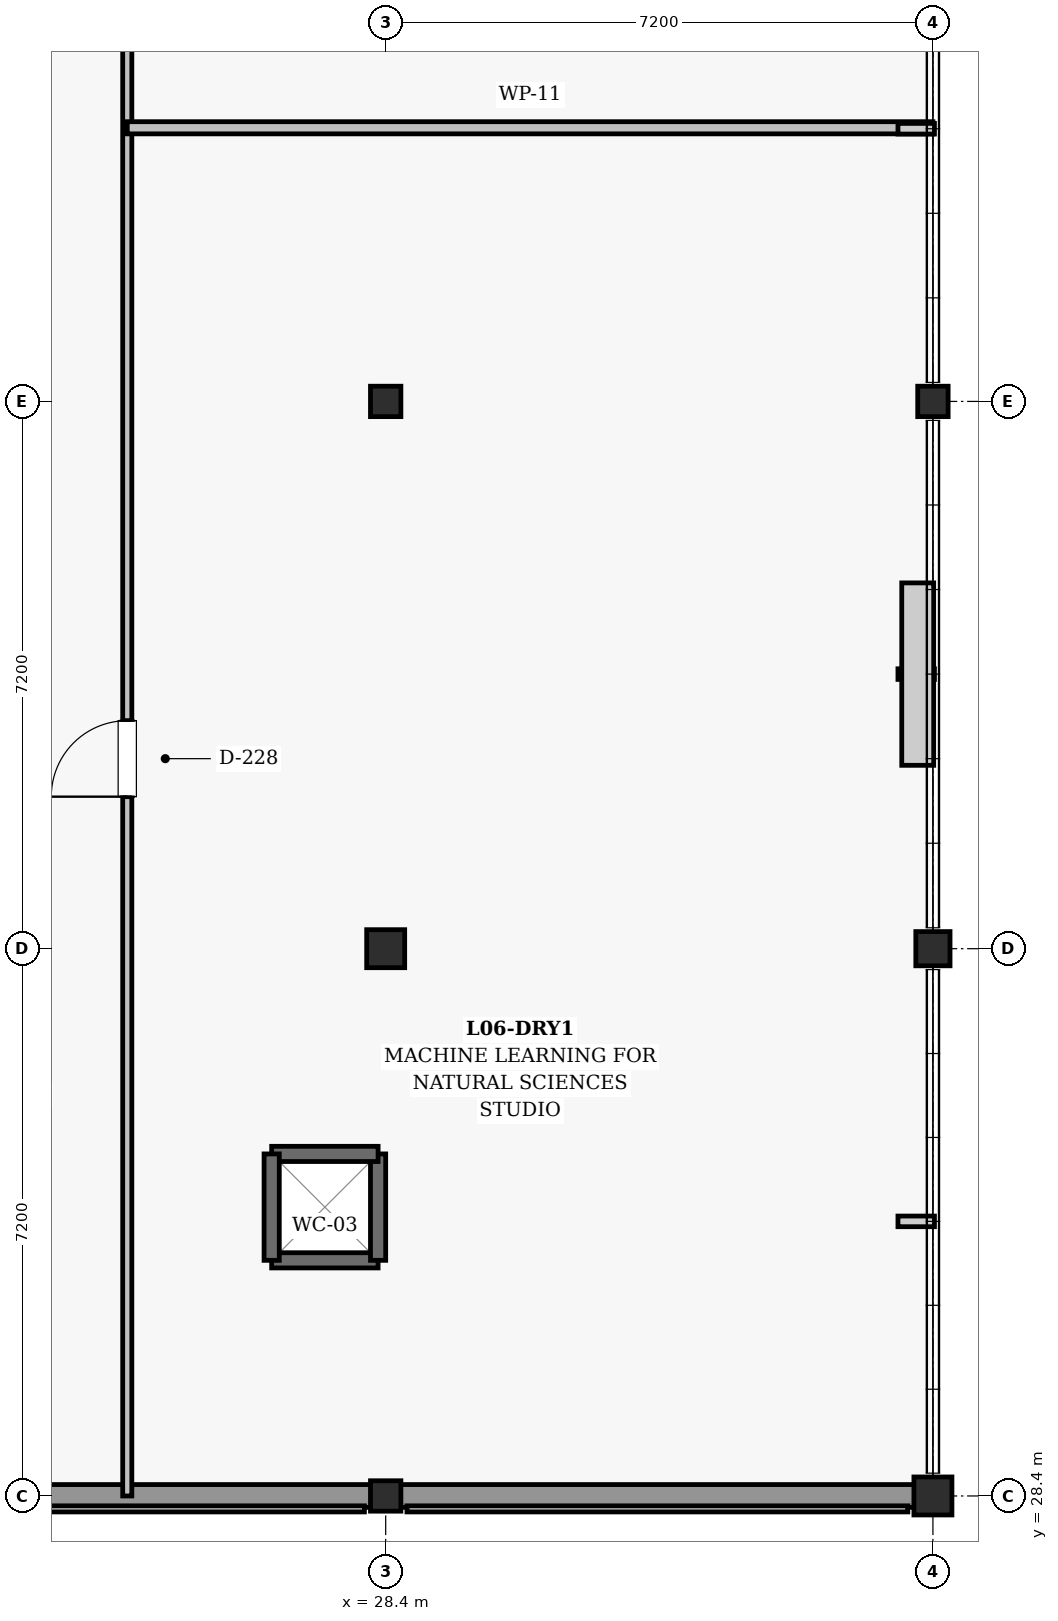
"""IFC4 building model, lengths in metres.
Left out: names, types, materials, properties, quantities, classifications, styles, units other than length and angle.
Written with IfcOpenShell. Run it as: python <this file> out.ifc"""

import sys

from ifc_helpers import new_model, si_unit, direction, frame, frame_2d, origin, origin_2d, place, context, subcontext, project, spatial, rectangle, extrude, element, fill, save


model = new_model("IFC4")
c1 = context("Model", 3, precision=1e-05, world=origin(), true_north=direction((0.0, 1.0)))
c2 = subcontext(c1, "Body", "Model", "MODEL_VIEW")
j1 = project(units=[si_unit("LENGTHUNIT", "METRE"), si_unit("PLANEANGLEUNIT", "RADIAN")], contexts=[c1])
p1 = place(None, origin())
s1 = spatial("IfcSite", under=j1, at=p1, CompositionType="ELEMENT")
p2 = place(p1, origin())
s2 = spatial("IfcBuilding", under=s1, at=p2, CompositionType="ELEMENT")
p3 = place(p2, frame((0.0, 0.0, 27.9)))
s3 = spatial("IfcBuildingStorey", under=s2, at=p3, CompositionType="ELEMENT", Elevation=27.9)
p4 = place(p3, frame((28.4, 28.4, 0.0), z_axis=(0.0, 0.0, 1.0), x_axis=(1.0, 0.0, 0.0)))
e1 = element("IfcColumn", 1, at=p4, inside=s3, PredefinedType="COLUMN", context=c2, shape_type="SweptSolid", body=[
    extrude(rectangle(XDim=0.4, YDim=0.4, at=origin_2d()), origin(), (0.0, 0.0, 1.0), 4.5),
])
p5 = place(p3, frame((28.4, 35.6, 0.0), z_axis=(0.0, 0.0, 1.0), x_axis=(1.0, 0.0, 0.0)))
e2 = element("IfcColumn", 2, at=p5, inside=s3, PredefinedType="COLUMN", context=c2, shape_type="SweptSolid", body=[
    extrude(rectangle(XDim=0.5, YDim=0.5, at=origin_2d()), origin(), (0.0, 0.0, 1.0), 4.5),
])
p6 = place(p3, frame((28.4, 42.8, 0.0), z_axis=(0.0, 0.0, 1.0), x_axis=(1.0, 0.0, 0.0)))
e3 = element("IfcColumn", 3, at=p6, inside=s3, PredefinedType="COLUMN", context=c2, shape_type="SweptSolid", body=[
    extrude(rectangle(XDim=0.4, YDim=0.4, at=origin_2d()), origin(), (0.0, 0.0, 1.0), 4.5),
])
p7 = place(p3, frame((35.6, 28.4, 0.0), z_axis=(0.0, 0.0, 1.0), x_axis=(1.0, 0.0, 0.0)))
e4 = element("IfcColumn", 4, at=p7, inside=s3, PredefinedType="COLUMN", context=c2, shape_type="SweptSolid", body=[
    extrude(rectangle(XDim=0.5, YDim=0.5, at=origin_2d()), origin(), (0.0, 0.0, 1.0), 4.5),
])
p8 = place(p3, frame((35.6, 35.6, 0.0), z_axis=(0.0, 0.0, 1.0), x_axis=(1.0, 0.0, 0.0)))
e5 = element("IfcColumn", 5, at=p8, inside=s3, PredefinedType="COLUMN", context=c2, shape_type="SweptSolid", body=[
    extrude(rectangle(XDim=0.45, YDim=0.45, at=origin_2d()), origin(), (0.0, 0.0, 1.0), 4.5),
])
p9 = place(p3, frame((35.6, 42.8, 0.0), z_axis=(0.0, 0.0, 1.0), x_axis=(1.0, 0.0, 0.0)))
e6 = element("IfcColumn", 6, at=p9, inside=s3, PredefinedType="COLUMN", context=c2, shape_type="SweptSolid", body=[
    extrude(rectangle(XDim=0.4, YDim=0.4, at=origin_2d()), origin(), (0.0, 0.0, 1.0), 4.5),
])
p10 = place(p3, frame((21.405, 28.4, 0.0), z_axis=(0.0, 0.0, 1.0), x_axis=(1.0, 0.0, 0.0)))
e7 = element("IfcWall", 7, at=p10, inside=s3, PredefinedType="SOLIDWALL", context=c2, shape_type="SweptSolid", body=[
    extrude(rectangle(XDim=6.815, YDim=0.3, at=frame_2d((3.407, 0.0))), origin(), (0.0, 0.0, 1.0), 3.455),
])
p11 = place(p3, frame((28.58, 28.4, 0.0), z_axis=(0.0, 0.0, 1.0), x_axis=(1.0, 0.0, 0.0)))
e8 = element("IfcWall", 8, at=p11, inside=s3, PredefinedType="SOLIDWALL", context=c2, shape_type="SweptSolid", body=[
    extrude(rectangle(XDim=6.79, YDim=0.3, at=frame_2d((3.395, 0.0))), origin(), (0.0, 0.0, 1.0), 3.455),
])
p12 = place(p3, frame((26.9, 31.5, 0.0), z_axis=(0.0, 0.0, 1.0), x_axis=(1.0, 0.0, 0.0)))
e9 = element("IfcWall", 9, at=p12, inside=s3, PredefinedType="SHEAR", context=c2, shape_type="SweptSolid", body=[
    extrude(rectangle(XDim=1.4, YDim=0.2, at=frame_2d((0.7, 0.0))), origin(), (0.0, 0.0, 1.0), 4.16),
])
p13 = place(p3, frame((28.3, 31.5, 0.0), z_axis=(0.0, 0.0, 1.0), x_axis=(0.0, 1.0, 0.0)))
e10 = element("IfcWall", 10, at=p13, inside=s3, PredefinedType="SHEAR", context=c2, shape_type="SweptSolid", body=[
    extrude(rectangle(XDim=1.4, YDim=0.2, at=frame_2d((0.7, 0.0))), origin(), (0.0, 0.0, 1.0), 4.16),
])
p14 = place(p3, frame((28.3, 32.9, 0.0), z_axis=(0.0, 0.0, 1.0), x_axis=(-1.0, 0.0, 0.0)))
e11 = element("IfcWall", 11, at=p14, inside=s3, PredefinedType="SHEAR", context=c2, shape_type="SweptSolid", body=[
    extrude(rectangle(XDim=1.4, YDim=0.2, at=frame_2d((0.7, 0.0))), origin(), (0.0, 0.0, 1.0), 4.16),
])
p15 = place(p3, frame((26.9, 32.9, 0.0), z_axis=(0.0, 0.0, 1.0), x_axis=(0.0, -1.0, 0.0)))
e12 = element("IfcWall", 12, at=p15, inside=s3, PredefinedType="SHEAR", context=c2, shape_type="SweptSolid", body=[
    extrude(rectangle(XDim=1.4, YDim=0.2, at=frame_2d((0.7, 0.0))), origin(), (0.0, 0.0, 1.0), 4.16),
])
p16 = place(p3, frame((25.0, 28.4, 0.0), z_axis=(0.0, 0.0, 1.0), x_axis=(0.0, 1.0, 0.0)))
e13 = element("IfcWall", 13, at=p16, inside=s3, PredefinedType="PARTITIONING", context=c2, shape_type="SweptSolid", body=[
    extrude(rectangle(XDim=74.4, YDim=0.12, at=frame_2d((37.2, 0.0))), origin(), (0.0, 0.0, 1.0), 3.36),
])
p17 = place(p16, frame((9.2, 0.0, 0.0)))
e14 = element("IfcOpeningElement", 14, at=p17, cuts=e13, PredefinedType="OPENING", context=c2, shape_type="SweptSolid", body=[
    extrude(rectangle(XDim=1.0, YDim=2.15, at=frame_2d((0.5, 1.075))), frame((0.0, 0.07, 0.0), z_axis=(0.0, -1.0, 0.0), x_axis=(1.0, 0.0, 0.0)), (0.0, 0.0, 1.0), 0.14),
])
p18 = place(p16, frame((27.0, 0.0, 0.0)))
e15 = element("IfcOpeningElement", 15, at=p18, cuts=e13, PredefinedType="OPENING", context=c2, shape_type="SweptSolid", body=[
    extrude(rectangle(XDim=1.1, YDim=2.15, at=frame_2d((0.55, 1.075))), frame((0.0, 0.07, 0.0), z_axis=(0.0, -1.0, 0.0), x_axis=(1.0, 0.0, 0.0)), (0.0, 0.0, 1.0), 0.14),
])
p19 = place(p16, frame((45.0, 0.0, 0.0)))
e16 = element("IfcOpeningElement", 16, at=p19, cuts=e13, PredefinedType="OPENING", context=c2, shape_type="SweptSolid", body=[
    extrude(rectangle(XDim=1.18, YDim=2.2, at=frame_2d((0.59, 1.1))), frame((0.0, 0.07, 0.0), z_axis=(0.0, -1.0, 0.0), x_axis=(1.0, 0.0, 0.0)), (0.0, 0.0, 1.0), 0.14),
])
p20 = place(p16, frame((66.0, 0.0, 0.0)))
e17 = element("IfcOpeningElement", 17, at=p20, cuts=e13, PredefinedType="OPENING", context=c2, shape_type="SweptSolid", body=[
    extrude(rectangle(XDim=1.25, YDim=2.2, at=frame_2d((0.625, 1.1))), frame((0.0, 0.07, 0.0), z_axis=(0.0, -1.0, 0.0), x_axis=(1.0, 0.0, 0.0)), (0.0, 0.0, 1.0), 0.14),
])
p21 = place(p3, frame((25.0, 46.4, 0.0), z_axis=(0.0, 0.0, 1.0), x_axis=(1.0, 0.0, 0.0)))
e18 = element("IfcWall", 18, at=p21, inside=s3, PredefinedType="PARTITIONING", context=c2, shape_type="SweptSolid", body=[
    extrude(rectangle(XDim=10.6, YDim=0.16, at=frame_2d((5.3, 0.0))), origin(), (0.0, 0.0, 1.0), 3.46),
])
p22 = place(p17, origin())
e19 = element("IfcDoor", 19, at=p22, inside=s3, OperationType="SINGLE_SWING_LEFT", PredefinedType="DOOR", context=c2, shape_type="SweptSolid", body=[
    extrude(rectangle(XDim=1.0, YDim=2.15, at=frame_2d((0.5, 1.075))), frame((0.0, 0.025, 0.0), z_axis=(0.0, -1.0, 0.0), x_axis=(1.0, 0.0, 0.0)), (0.0, 0.0, 1.0), 0.05),
])
fill(e14, e19)
save(model, sys.argv[1])
